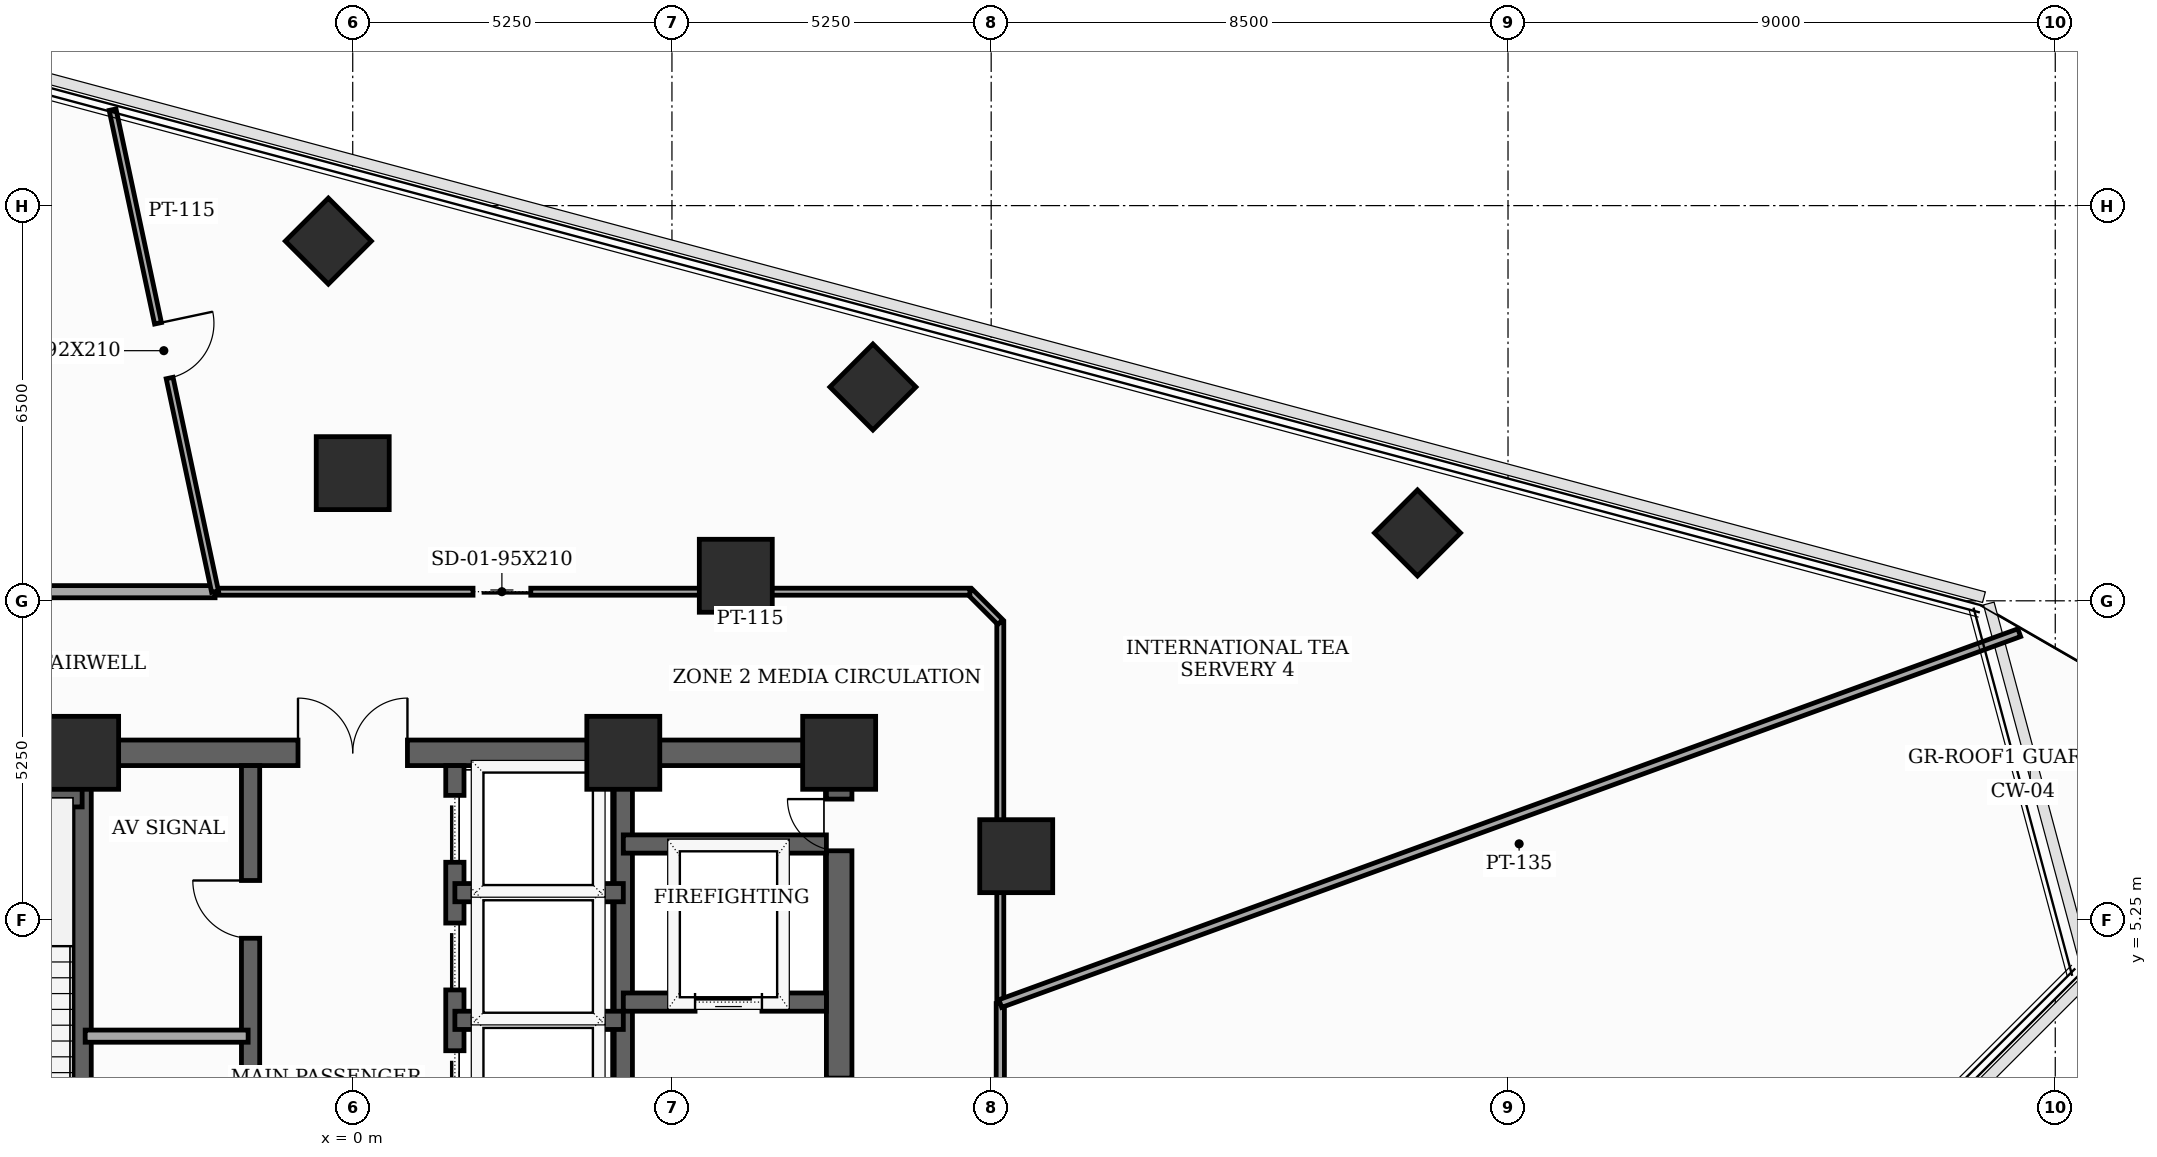
"""IFC4 building model, lengths in metres.
Left out: names, types, materials, properties, quantities, classifications, styles, units other than length and angle.
Written with IfcOpenShell. Run it as: python <this file> out.ifc"""

import sys

from ifc_helpers import new_model, si_unit, direction, frame, frame_2d, origin, origin_2d, place, context, subcontext, project, spatial, rectangle, extrude, element, fill, save


model = new_model("IFC4")
c1 = context("Model", 3, precision=1e-05, world=origin(), true_north=direction((0.0, 1.0)))
c2 = subcontext(c1, "Body", "Model", "MODEL_VIEW")
j1 = project(units=[si_unit("LENGTHUNIT", "METRE"), si_unit("PLANEANGLEUNIT", "RADIAN")], contexts=[c1])
p1 = place(None, origin())
s1 = spatial("IfcSite", under=j1, at=p1, CompositionType="ELEMENT")
p2 = place(p1, origin())
s2 = spatial("IfcBuilding", under=s1, at=p2, CompositionType="ELEMENT")
p3 = place(p2, frame((0.0, 0.0, 199.0)))
s3 = spatial("IfcBuildingStorey", under=s2, at=p3, CompositionType="ELEMENT", Elevation=199.0)
for number, where, z_axis, x_axis in (
    (1, (8.0, 8.0, 0.0), (0.0, 0.0, 1.0), (1.0, 0.0, 0.0)),
    (2, (4.45, 8.0, 0.0), (0.0, 0.0, 1.0), (1.0, 0.0, 0.0)),
    (3, (-4.45, 8.0, 0.0), (0.0, 0.0, 1.0), (1.0, 0.0, 0.0)),
    (4, (10.912, 6.3, 0.0), (0.0, 0.0, 1.0), (1.0, 0.0, 0.0)),
    (5, (6.3, 10.912, 0.0), (0.0, 0.0, 1.0), (1.0, 0.0, 0.0)),
    (6, (0.0, 12.6, 0.0), (0.0, 0.0, 1.0), (1.0, 0.0, 0.0)),
):
    element("IfcColumn", number, at=place(p3, frame(where, z_axis=z_axis, x_axis=x_axis)), inside=s3, PredefinedType="COLUMN", context=c2, shape_type="SweptSolid", body=[
        extrude(rectangle(XDim=1.2, YDim=1.2, at=origin_2d()), origin(), (0.0, 0.0, 1.0), 3.7),
    ])
for number, where, z_axis, x_axis in (
    (7, (17.511, 11.616, 0.0), (0.0, 0.0, 1.0), (0.707, 0.707, 0.0)),
    (8, (8.555, 14.016, 0.0), (0.0, 0.0, 1.0), (0.707, 0.707, 0.0)),
    (9, (-0.401, 16.416, 0.0), (0.0, 0.0, 1.0), (0.707, 0.707, 0.0)),
):
    element("IfcColumn", number, at=place(p3, frame(where, z_axis=z_axis, x_axis=x_axis)), inside=s3, PredefinedType="COLUMN", context=c2, shape_type="SweptSolid", body=[
        extrude(rectangle(XDim=1.0, YDim=1.0, at=origin_2d()), origin(), (0.0, 0.0, 1.0), 3.7),
    ])
p4 = place(p3, frame((8.0, -8.0, 0.0), z_axis=(0.0, 0.0, 1.0), x_axis=(0.0, 1.0, 0.0)))
e10 = element("IfcWall", 10, at=p4, inside=s3, PredefinedType="SHEAR", context=c2, shape_type="SweptSolid", body=[
    extrude(rectangle(XDim=16.0, YDim=0.42, at=frame_2d((8.0, 0.0))), origin(), (0.0, 0.0, 1.0), 3.5),
])
p5 = place(p4, frame((9.6, 0.0, 0.0)))
e11 = element("IfcOpeningElement", 11, at=p5, cuts=e10, PredefinedType="OPENING", context=c2, shape_type="SweptSolid", body=[
    extrude(rectangle(XDim=1.05, YDim=2.15, at=frame_2d((0.525, 1.075))), frame((0.0, 0.22, 0.0), z_axis=(0.0, -1.0, 0.0), x_axis=(1.0, 0.0, 0.0)), (0.0, 0.0, 1.0), 0.44),
])
p6 = place(p4, frame((14.389, 0.0, 0.0)))
e12 = element("IfcOpeningElement", 12, at=p6, cuts=e10, PredefinedType="OPENING", context=c2, shape_type="SweptSolid", body=[
    extrude(rectangle(XDim=0.85, YDim=2.02, at=frame_2d((0.425, 1.01))), frame((0.0, 0.22, 0.0), z_axis=(0.0, -1.0, 0.0), x_axis=(1.0, 0.0, 0.0)), (0.0, 0.0, 1.0), 0.44),
])
p7 = place(p3, frame((-8.0, 8.0, 0.0), z_axis=(0.0, 0.0, 1.0), x_axis=(1.0, 0.0, 0.0)))
e13 = element("IfcWall", 13, at=p7, inside=s3, PredefinedType="SHEAR", context=c2, shape_type="SweptSolid", body=[
    extrude(rectangle(XDim=16.0, YDim=0.42, at=frame_2d((8.0, 0.0))), origin(), (0.0, 0.0, 1.0), 3.5),
])
p8 = place(p7, frame((7.1, 0.0, 0.0)))
e14 = element("IfcOpeningElement", 14, at=p8, cuts=e13, PredefinedType="OPENING", context=c2, shape_type="SweptSolid", body=[
    extrude(rectangle(XDim=1.8, YDim=2.15, at=frame_2d((0.9, 1.075))), frame((0.0, 0.22, 0.0), z_axis=(0.0, -1.0, 0.0), x_axis=(1.0, 0.0, 0.0)), (0.0, 0.0, 1.0), 0.44),
])
for number, where, z_axis, x_axis in (
    (15, (-4.45, -7.79, 0.0), (0.0, 0.0, 1.0), (0.0, 1.0, 0.0)),
    (16, (4.45, -7.79, 0.0), (0.0, 0.0, 1.0), (0.0, 1.0, 0.0)),
):
    element("IfcWall", number, at=place(p3, frame(where, z_axis=z_axis, x_axis=x_axis)), inside=s3, PredefinedType="SHEAR", context=c2, shape_type="SweptSolid", body=[
        extrude(rectangle(XDim=15.58, YDim=0.3, at=frame_2d((7.79, 0.0))), origin(), (0.0, 0.0, 1.0), 3.5),
    ])
p9 = place(p3, frame((-7.79, 7.26, 0.0), z_axis=(0.0, 0.0, 1.0), x_axis=(1.0, 0.0, 0.0)))
e17 = element("IfcWall", 17, at=p9, inside=s3, PredefinedType="SHEAR", context=c2, shape_type="SweptSolid", body=[
    extrude(rectangle(XDim=3.34, YDim=0.3, at=frame_2d((1.67, 0.0))), origin(), (0.0, 0.0, 1.0), 3.5),
])
p10 = place(p3, frame((4.45, 3.9, 0.0), z_axis=(0.0, 0.0, 1.0), x_axis=(1.0, 0.0, 0.0)))
e18 = element("IfcWall", 18, at=p10, inside=s3, PredefinedType="SHEAR", context=c2, shape_type="SweptSolid", body=[
    extrude(rectangle(XDim=3.34, YDim=0.3, at=frame_2d((1.67, 0.0))), origin(), (0.0, 0.0, 1.0), 3.5),
])
p11 = place(p10, frame((1.18, 0.0, 0.0)))
e19 = element("IfcOpeningElement", 19, at=p11, cuts=e18, PredefinedType="OPENING", context=c2, shape_type="SweptSolid", body=[
    extrude(rectangle(XDim=1.1, YDim=2.1, at=frame_2d((0.55, 1.05))), frame((0.0, 0.16, 0.0), z_axis=(0.0, -1.0, 0.0), x_axis=(1.0, 0.0, 0.0)), (0.0, 0.0, 1.0), 0.32),
])
p12 = place(p3, frame((4.45, 6.5, 0.0), z_axis=(0.0, 0.0, 1.0), x_axis=(1.0, 0.0, 0.0)))
e20 = element("IfcWall", 20, at=p12, inside=s3, PredefinedType="SHEAR", context=c2, shape_type="SweptSolid", body=[
    extrude(rectangle(XDim=3.34, YDim=0.3, at=frame_2d((1.67, 0.0))), origin(), (0.0, 0.0, 1.0), 3.5),
])
p13 = place(p3, frame((-1.68, -4.85, 0.0), z_axis=(0.0, 0.0, 1.0), x_axis=(0.0, 1.0, 0.0)))
e21 = element("IfcWall", 21, at=p13, inside=s3, PredefinedType="SHEAR", context=c2, shape_type="SweptSolid", body=[
    extrude(rectangle(XDim=12.64, YDim=0.3, at=frame_2d((6.32, 0.0))), origin(), (0.0, 0.0, 1.0), 3.5),
])
p14 = place(p13, frame((3.5, 0.0, 0.0)))
e22 = element("IfcOpeningElement", 22, at=p14, cuts=e21, PredefinedType="OPENING", context=c2, shape_type="SweptSolid", body=[
    extrude(rectangle(XDim=0.95, YDim=2.1, at=frame_2d((0.475, 1.05))), frame((0.0, 0.16, 0.0), z_axis=(0.0, -1.0, 0.0), x_axis=(1.0, 0.0, 0.0)), (0.0, 0.0, 1.0), 0.32),
])
p15 = place(p13, frame((9.8, 0.0, 0.0)))
e23 = element("IfcOpeningElement", 23, at=p15, cuts=e21, PredefinedType="OPENING", context=c2, shape_type="SweptSolid", body=[
    extrude(rectangle(XDim=0.95, YDim=2.1, at=frame_2d((0.475, 1.05))), frame((0.0, 0.16, 0.0), z_axis=(0.0, -1.0, 0.0), x_axis=(1.0, 0.0, 0.0)), (0.0, 0.0, 1.0), 0.32),
])
p16 = place(p3, frame((1.68, -4.85, 0.0), z_axis=(0.0, 0.0, 1.0), x_axis=(0.0, 1.0, 0.0)))
e24 = element("IfcWall", 24, at=p16, inside=s3, PredefinedType="SHEAR", context=c2, shape_type="SweptSolid", body=[
    extrude(rectangle(XDim=12.64, YDim=0.3, at=frame_2d((6.32, 0.0))), origin(), (0.0, 0.0, 1.0), 3.5),
])
p17 = place(p16, frame((0.55, 0.0, 0.0)))
e25 = element("IfcOpeningElement", 25, at=p17, cuts=e24, PredefinedType="OPENING", context=c2, shape_type="SweptSolid", body=[
    extrude(rectangle(XDim=1.1, YDim=2.1, at=frame_2d((0.55, 1.05))), frame((0.0, 0.16, 0.0), z_axis=(0.0, -1.0, 0.0), x_axis=(1.0, 0.0, 0.0)), (0.0, 0.0, 1.0), 0.32),
])
p18 = place(p16, frame((2.65, 0.0, 0.0)))
e26 = element("IfcOpeningElement", 26, at=p18, cuts=e24, PredefinedType="OPENING", context=c2, shape_type="SweptSolid", body=[
    extrude(rectangle(XDim=1.1, YDim=2.1, at=frame_2d((0.55, 1.05))), frame((0.0, 0.16, 0.0), z_axis=(0.0, -1.0, 0.0), x_axis=(1.0, 0.0, 0.0)), (0.0, 0.0, 1.0), 0.32),
])
p19 = place(p16, frame((4.75, 0.0, 0.0)))
e27 = element("IfcOpeningElement", 27, at=p19, cuts=e24, PredefinedType="OPENING", context=c2, shape_type="SweptSolid", body=[
    extrude(rectangle(XDim=1.1, YDim=2.1, at=frame_2d((0.55, 1.05))), frame((0.0, 0.16, 0.0), z_axis=(0.0, -1.0, 0.0), x_axis=(1.0, 0.0, 0.0)), (0.0, 0.0, 1.0), 0.32),
])
p20 = place(p16, frame((6.85, 0.0, 0.0)))
e28 = element("IfcOpeningElement", 28, at=p20, cuts=e24, PredefinedType="OPENING", context=c2, shape_type="SweptSolid", body=[
    extrude(rectangle(XDim=1.1, YDim=2.1, at=frame_2d((0.55, 1.05))), frame((0.0, 0.16, 0.0), z_axis=(0.0, -1.0, 0.0), x_axis=(1.0, 0.0, 0.0)), (0.0, 0.0, 1.0), 0.32),
])
p21 = place(p16, frame((8.95, 0.0, 0.0)))
e29 = element("IfcOpeningElement", 29, at=p21, cuts=e24, PredefinedType="OPENING", context=c2, shape_type="SweptSolid", body=[
    extrude(rectangle(XDim=1.1, YDim=2.1, at=frame_2d((0.55, 1.05))), frame((0.0, 0.16, 0.0), z_axis=(0.0, -1.0, 0.0), x_axis=(1.0, 0.0, 0.0)), (0.0, 0.0, 1.0), 0.32),
])
p22 = place(p16, frame((11.05, 0.0, 0.0)))
e30 = element("IfcOpeningElement", 30, at=p22, cuts=e24, PredefinedType="OPENING", context=c2, shape_type="SweptSolid", body=[
    extrude(rectangle(XDim=1.1, YDim=2.1, at=frame_2d((0.55, 1.05))), frame((0.0, 0.16, 0.0), z_axis=(0.0, -1.0, 0.0), x_axis=(1.0, 0.0, 0.0)), (0.0, 0.0, 1.0), 0.32),
])
for number, where, z_axis, x_axis in (
    (31, (1.68, 3.6, 0.0), (0.0, 0.0, 1.0), (1.0, 0.0, 0.0)),
    (32, (1.68, 5.7, 0.0), (0.0, 0.0, 1.0), (1.0, 0.0, 0.0)),
):
    element("IfcWall", number, at=place(p3, frame(where, z_axis=z_axis, x_axis=x_axis)), inside=s3, PredefinedType="SHEAR", context=c2, shape_type="SweptSolid", body=[
        extrude(rectangle(XDim=2.77, YDim=0.3, at=frame_2d((1.385, 0.0))), origin(), (0.0, 0.0, 1.0), 3.5),
    ])
p23 = place(p3, frame((-4.4, 3.34, 0.0), z_axis=(0.0, 0.0, 1.0), x_axis=(1.0, 0.0, 0.0)))
e33 = element("IfcWall", 33, at=p23, inside=s3, PredefinedType="SOLIDWALL", context=c2, shape_type="SweptSolid", body=[
    extrude(rectangle(XDim=2.68, YDim=0.2, at=frame_2d((1.34, 0.0))), origin(), (0.0, 0.0, 1.0), 3.5),
])
p24 = place(p3, frame((10.65, -7.738, 0.0), z_axis=(0.0, 0.0, 1.0), x_axis=(0.0, 1.0, 0.0)))
e34 = element("IfcWall", 34, at=p24, inside=s3, PredefinedType="PARTITIONING", context=c2, shape_type="SweptSolid", body=[
    extrude(rectangle(XDim=11.614, YDim=0.135, at=frame_2d((5.807, 0.0))), origin(), (0.0, 0.0, 1.0), 2.885),
])
p25 = place(p24, frame((5.332, 0.0, 0.0)))
e35 = element("IfcOpeningElement", 35, at=p25, cuts=e34, PredefinedType="OPENING", context=c2, shape_type="SweptSolid", body=[
    extrude(rectangle(XDim=0.95, YDim=2.1, at=frame_2d((0.475, 1.05))), frame((0.0, 0.077, 0.0), z_axis=(0.0, -1.0, 0.0), x_axis=(1.0, 0.0, 0.0)), (0.0, 0.0, 1.0), 0.155),
])
p26 = place(p3, frame((10.65, 3.876, 0.0), z_axis=(0.0, 0.0, 1.0), x_axis=(0.0, 1.0, 0.0)))
e36 = element("IfcWall", 36, at=p26, inside=s3, PredefinedType="PARTITIONING", context=c2, shape_type="SweptSolid", body=[
    extrude(rectangle(XDim=6.274, YDim=0.115, at=frame_2d((3.137, 0.0))), origin(), (0.0, 0.0, 1.0), 2.885),
])
p27 = place(p3, frame((10.65, 10.15, 0.0), z_axis=(0.0, 0.0, 1.0), x_axis=(-0.707106781187, 0.707106781187, 0.0)))
e37 = element("IfcWall", 37, at=p27, inside=s3, PredefinedType="PARTITIONING", context=c2, shape_type="SweptSolid", body=[
    extrude(rectangle(XDim=0.707, YDim=0.115, at=frame_2d((0.354, 0.0))), origin(), (0.0, 0.0, 1.0), 3.5),
])
p28 = place(p3, frame((10.15, 10.65, 0.0), z_axis=(0.0, 0.0, 1.0), x_axis=(-1.0, 0.0, 0.0)))
e38 = element("IfcWall", 38, at=p28, inside=s3, PredefinedType="PARTITIONING", context=c2, shape_type="SweptSolid", body=[
    extrude(rectangle(XDim=12.414, YDim=0.115, at=frame_2d((6.207, 0.0))), origin(), (0.0, 0.0, 1.0), 2.885),
])
p29 = place(p28, frame((7.222, 0.0, 0.0)))
e39 = element("IfcOpeningElement", 39, at=p29, cuts=e38, PredefinedType="OPENING", context=c2, shape_type="SweptSolid", body=[
    extrude(rectangle(XDim=0.95, YDim=2.1, at=frame_2d((0.475, 1.05))), frame((0.0, 0.067, 0.0), z_axis=(0.0, -1.0, 0.0), x_axis=(1.0, 0.0, 0.0)), (0.0, 0.0, 1.0), 0.135),
])
p30 = place(p3, frame((-2.264, 10.65, 0.0), z_axis=(0.0, 0.0, 1.0), x_axis=(-1.0, 0.0, 0.0)))
e40 = element("IfcWall", 40, at=p30, inside=s3, PredefinedType="SOLIDWALL", context=c2, shape_type="SweptSolid", body=[
    extrude(rectangle(XDim=7.886, YDim=0.2, at=frame_2d((3.943, 0.0))), origin(), (0.0, 0.0, 1.0), 2.885),
])
p31 = place(p3, frame((27.408, 9.976, 0.0), z_axis=(0.0, 0.0, 1.0), x_axis=(-0.939687855064, -0.342033236756, 0.0)))
e41 = element("IfcWall", 41, at=p31, inside=s3, PredefinedType="PARTITIONING", context=c2, shape_type="SweptSolid", body=[
    extrude(rectangle(XDim=17.833, YDim=0.135, at=frame_2d((8.917, 0.0))), origin(), (0.0, 0.0, 1.0), 2.885),
])
p32 = place(p3, frame((-3.949, 18.578, 0.0), z_axis=(0.0, 0.0, 1.0), x_axis=(0.20795313807, -0.978138789931, 0.0)))
e42 = element("IfcWall", 42, at=p32, inside=s3, PredefinedType="PARTITIONING", context=c2, shape_type="SweptSolid", body=[
    extrude(rectangle(XDim=8.105, YDim=0.115, at=frame_2d((4.053, 0.0))), origin(), (0.0, 0.0, 1.0), 2.885),
])
p33 = place(p32, frame((3.593, 0.0, 0.0)))
e43 = element("IfcOpeningElement", 43, at=p33, cuts=e42, PredefinedType="OPENING", context=c2, shape_type="SweptSolid", body=[
    extrude(rectangle(XDim=0.92, YDim=2.1, at=frame_2d((0.46, 1.05))), frame((0.0, 0.067, 0.0), z_axis=(0.0, -1.0, 0.0), x_axis=(1.0, 0.0, 0.0)), (0.0, 0.0, 1.0), 0.135),
])
p34 = place(p6, origin())
e44 = element("IfcDoor", 44, at=p34, inside=s3, OperationType="SINGLE_SWING_RIGHT", PredefinedType="TRAPDOOR", context=c2, shape_type="SweptSolid", body=[
    extrude(rectangle(XDim=0.85, YDim=2.02, at=frame_2d((0.425, 1.01))), frame((0.0, 0.025, 0.0), z_axis=(0.0, -1.0, 0.0), x_axis=(1.0, 0.0, 0.0)), (0.0, 0.0, 1.0), 0.05),
])
fill(e12, e44)
p35 = place(p8, origin())
e45 = element("IfcDoor", 45, at=p35, inside=s3, OperationType="DOUBLE_DOOR_SINGLE_SWING", PredefinedType="DOOR", context=c2, shape_type="SweptSolid", body=[
    extrude(rectangle(XDim=1.8, YDim=2.15, at=frame_2d((0.9, 1.075))), frame((0.0, 0.025, 0.0), z_axis=(0.0, -1.0, 0.0), x_axis=(1.0, 0.0, 0.0)), (0.0, 0.0, 1.0), 0.05),
])
fill(e14, e45)
p36 = place(p11, origin())
e46 = element("IfcDoor", 46, at=p36, inside=s3, OperationType="SLIDING_TO_LEFT", PredefinedType="DOOR", context=c2, shape_type="SweptSolid", body=[
    extrude(rectangle(XDim=1.1, YDim=2.1, at=frame_2d((0.55, 1.05))), frame((0.0, 0.025, 0.0), z_axis=(0.0, -1.0, 0.0), x_axis=(1.0, 0.0, 0.0)), (0.0, 0.0, 1.0), 0.05),
])
fill(e19, e46)
p37 = place(p15, origin())
e47 = element("IfcDoor", 47, at=p37, inside=s3, OperationType="SINGLE_SWING_RIGHT", PredefinedType="DOOR", context=c2, shape_type="SweptSolid", body=[
    extrude(rectangle(XDim=0.95, YDim=2.1, at=frame_2d((0.475, 1.05))), frame((0.0, 0.025, 0.0), z_axis=(0.0, -1.0, 0.0), x_axis=(1.0, 0.0, 0.0)), (0.0, 0.0, 1.0), 0.05),
])
fill(e23, e47)
p38 = place(p20, origin())
e48 = element("IfcDoor", 48, at=p38, inside=s3, OperationType="SLIDING_TO_LEFT", PredefinedType="DOOR", context=c2, shape_type="SweptSolid", body=[
    extrude(rectangle(XDim=1.1, YDim=2.1, at=frame_2d((0.55, 1.05))), frame((0.0, 0.025, 0.0), z_axis=(0.0, -1.0, 0.0), x_axis=(1.0, 0.0, 0.0)), (0.0, 0.0, 1.0), 0.05),
])
fill(e28, e48)
p39 = place(p21, origin())
e49 = element("IfcDoor", 49, at=p39, inside=s3, OperationType="SLIDING_TO_LEFT", PredefinedType="DOOR", context=c2, shape_type="SweptSolid", body=[
    extrude(rectangle(XDim=1.1, YDim=2.1, at=frame_2d((0.55, 1.05))), frame((0.0, 0.025, 0.0), z_axis=(0.0, -1.0, 0.0), x_axis=(1.0, 0.0, 0.0)), (0.0, 0.0, 1.0), 0.05),
])
fill(e29, e49)
p40 = place(p22, origin())
e50 = element("IfcDoor", 50, at=p40, inside=s3, OperationType="SLIDING_TO_LEFT", PredefinedType="DOOR", context=c2, shape_type="SweptSolid", body=[
    extrude(rectangle(XDim=1.1, YDim=2.1, at=frame_2d((0.55, 1.05))), frame((0.0, 0.025, 0.0), z_axis=(0.0, -1.0, 0.0), x_axis=(1.0, 0.0, 0.0)), (0.0, 0.0, 1.0), 0.05),
])
fill(e30, e50)
p41 = place(p29, origin())
e51 = element("IfcDoor", 51, at=p41, inside=s3, OperationType="SLIDING_TO_LEFT", PredefinedType="DOOR", context=c2, shape_type="SweptSolid", body=[
    extrude(rectangle(XDim=0.95, YDim=2.1, at=frame_2d((0.475, 1.05))), frame((0.0, 0.025, 0.0), z_axis=(0.0, -1.0, 0.0), x_axis=(1.0, 0.0, 0.0)), (0.0, 0.0, 1.0), 0.05),
])
fill(e39, e51)
p42 = place(p33, origin())
e52 = element("IfcDoor", 52, at=p42, inside=s3, OperationType="SINGLE_SWING_LEFT", PredefinedType="DOOR", context=c2, shape_type="SweptSolid", body=[
    extrude(rectangle(XDim=0.92, YDim=2.1, at=frame_2d((0.46, 1.05))), frame((0.0, 0.025, 0.0), z_axis=(0.0, -1.0, 0.0), x_axis=(1.0, 0.0, 0.0)), (0.0, 0.0, 1.0), 0.05),
])
fill(e43, e52)
save(model, sys.argv[1])
